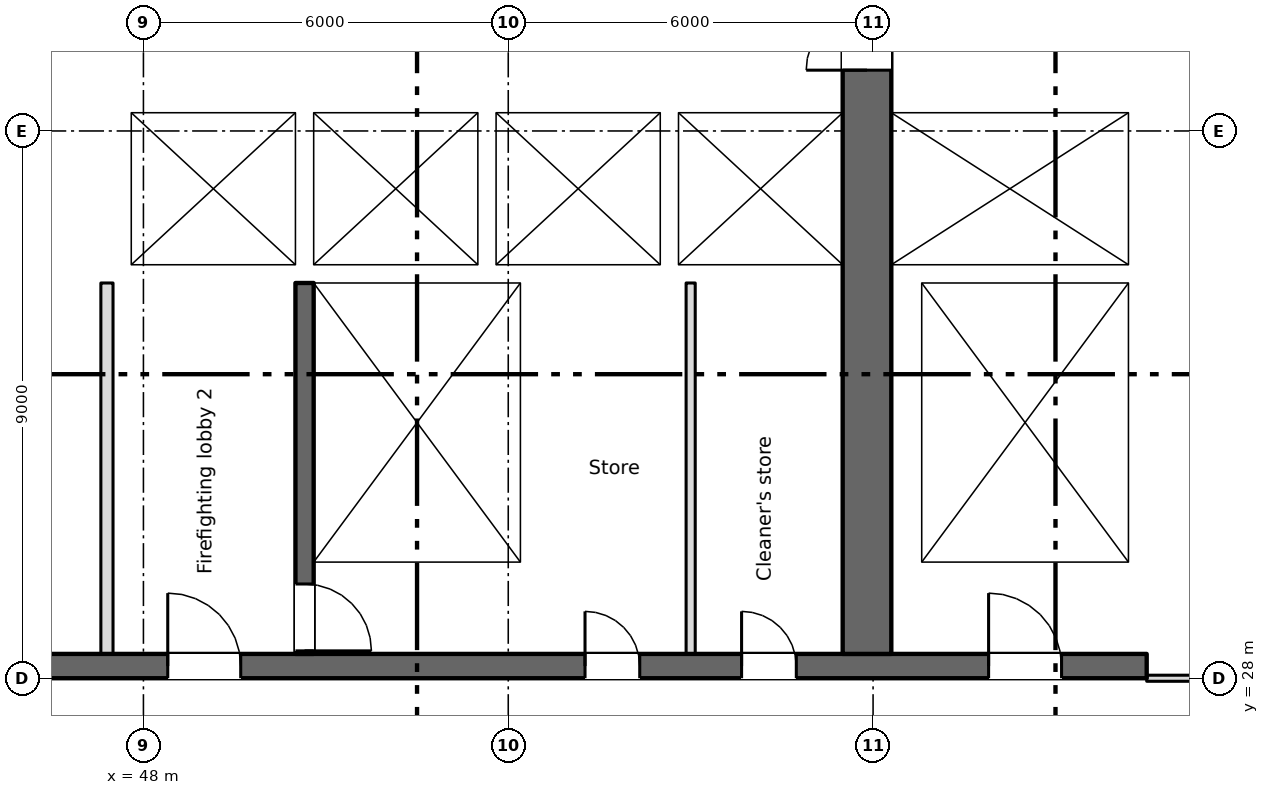
"""IFC4 building model, lengths in metres.
Left out: names, types, materials, properties, quantities, classifications, styles, units other than length and angle.
Written with IfcOpenShell. Run it as: python <this file> out.ifc"""

import sys

from ifc_helpers import new_model, si_unit, direction, frame, frame_2d, origin, place, context, subcontext, project, spatial, rectangle, extrude, element, fill, save


model = new_model("IFC4")
c1 = context("Model", 3, precision=1e-05, world=origin(), true_north=direction((0.0, 1.0)))
c2 = subcontext(c1, "Body", "Model", "MODEL_VIEW")
j1 = project(units=[si_unit("LENGTHUNIT", "METRE"), si_unit("PLANEANGLEUNIT", "RADIAN")], contexts=[c1])
p1 = place(None, origin())
s1 = spatial("IfcSite", under=j1, at=p1, CompositionType="ELEMENT")
p2 = place(p1, origin())
s2 = spatial("IfcBuilding", under=s1, at=p2, CompositionType="ELEMENT")
p3 = place(p2, frame((0.0, 0.0, 147.5)))
s3 = spatial("IfcBuildingStorey", under=s2, at=p3, CompositionType="ELEMENT", Elevation=147.5)
p4 = place(p3, frame((6.7, 28.2, 0.0), z_axis=(0.0, 0.0, 1.0), x_axis=(1.0, 0.0, 0.0)))
e1 = element("IfcWall", 1, at=p4, inside=s3, PredefinedType="SHEAR", context=c2, shape_type="SweptSolid", body=[
    extrude(rectangle(XDim=57.8, YDim=0.4, at=frame_2d((28.9, 0.0))), origin(), (0.0, 0.0, 1.0), 3.35),
])
p5 = place(p4, frame((13.85, 0.0, 0.0)))
e2 = element("IfcOpeningElement", 2, at=p5, cuts=e1, PredefinedType="OPENING", context=c2, shape_type="SweptSolid", body=[
    extrude(rectangle(XDim=0.9, YDim=2.1, at=frame_2d((0.45, 1.05))), frame((0.0, 0.21, 0.0), z_axis=(0.0, -1.0, 0.0), x_axis=(1.0, 0.0, 0.0)), (0.0, 0.0, 1.0), 0.42),
])
p6 = place(p4, frame((48.562, 0.0, 0.0)))
e3 = element("IfcOpeningElement", 3, at=p6, cuts=e1, PredefinedType="OPENING", context=c2, shape_type="SweptSolid", body=[
    extrude(rectangle(XDim=0.9, YDim=2.1, at=frame_2d((0.45, 1.05))), frame((0.0, 0.21, 0.0), z_axis=(0.0, -1.0, 0.0), x_axis=(1.0, 0.0, 0.0)), (0.0, 0.0, 1.0), 0.42),
])
p7 = place(p4, frame((51.137, 0.0, 0.0)))
e4 = element("IfcOpeningElement", 4, at=p7, cuts=e1, PredefinedType="OPENING", context=c2, shape_type="SweptSolid", body=[
    extrude(rectangle(XDim=0.9, YDim=2.1, at=frame_2d((0.45, 1.05))), frame((0.0, 0.21, 0.0), z_axis=(0.0, -1.0, 0.0), x_axis=(1.0, 0.0, 0.0)), (0.0, 0.0, 1.0), 0.42),
])
p8 = place(p4, frame((1.35, 0.0, 0.0)))
e5 = element("IfcOpeningElement", 5, at=p8, cuts=e1, PredefinedType="OPENING", context=c2, shape_type="SweptSolid", body=[
    extrude(rectangle(XDim=0.9, YDim=2.1, at=frame_2d((0.45, 1.05))), frame((0.0, 0.21, 0.0), z_axis=(0.0, -1.0, 0.0), x_axis=(1.0, 0.0, 0.0)), (0.0, 0.0, 1.0), 0.42),
])
p9 = place(p4, frame((4.7, 0.0, 0.0)))
e6 = element("IfcOpeningElement", 6, at=p9, cuts=e1, PredefinedType="OPENING", context=c2, shape_type="SweptSolid", body=[
    extrude(rectangle(XDim=1.2, YDim=2.1, at=frame_2d((0.6, 1.05))), frame((0.0, 0.21, 0.0), z_axis=(0.0, -1.0, 0.0), x_axis=(1.0, 0.0, 0.0)), (0.0, 0.0, 1.0), 0.42),
])
p10 = place(p4, frame((31.7, 0.0, 0.0)))
e7 = element("IfcOpeningElement", 7, at=p10, cuts=e1, PredefinedType="OPENING", context=c2, shape_type="SweptSolid", body=[
    extrude(rectangle(XDim=1.2, YDim=2.1, at=frame_2d((0.6, 1.05))), frame((0.0, 0.21, 0.0), z_axis=(0.0, -1.0, 0.0), x_axis=(1.0, 0.0, 0.0)), (0.0, 0.0, 1.0), 0.42),
])
p11 = place(p4, frame((55.2, 0.0, 0.0)))
e8 = element("IfcOpeningElement", 8, at=p11, cuts=e1, PredefinedType="OPENING", context=c2, shape_type="SweptSolid", body=[
    extrude(rectangle(XDim=1.2, YDim=2.1, at=frame_2d((0.6, 1.05))), frame((0.0, 0.21, 0.0), z_axis=(0.0, -1.0, 0.0), x_axis=(1.0, 0.0, 0.0)), (0.0, 0.0, 1.0), 0.42),
])
p12 = place(p4, frame((21.7, 0.0, 0.0)))
e9 = element("IfcOpeningElement", 9, at=p12, cuts=e1, PredefinedType="OPENING", context=c2, shape_type="SweptSolid", body=[
    extrude(rectangle(XDim=1.2, YDim=2.1, at=frame_2d((0.6, 1.05))), frame((0.0, 0.21, 0.0), z_axis=(0.0, -1.0, 0.0), x_axis=(1.0, 0.0, 0.0)), (0.0, 0.0, 1.0), 0.42),
])
p13 = place(p4, frame((41.7, 0.0, 0.0)))
e10 = element("IfcOpeningElement", 10, at=p13, cuts=e1, PredefinedType="OPENING", context=c2, shape_type="SweptSolid", body=[
    extrude(rectangle(XDim=1.2, YDim=2.1, at=frame_2d((0.6, 1.05))), frame((0.0, 0.21, 0.0), z_axis=(0.0, -1.0, 0.0), x_axis=(1.0, 0.0, 0.0)), (0.0, 0.0, 1.0), 0.42),
])
p14 = place(p4, frame((24.85, 0.0, 0.0)))
e11 = element("IfcOpeningElement", 11, at=p14, cuts=e1, PredefinedType="OPENING", context=c2, shape_type="SweptSolid", body=[
    extrude(rectangle(XDim=2.4, YDim=2.1, at=frame_2d((1.2, 1.05))), frame((0.0, 0.21, 0.0), z_axis=(0.0, -1.0, 0.0), x_axis=(1.0, 0.0, 0.0)), (0.0, 0.0, 1.0), 0.42),
])
p15 = place(p4, frame((37.35, 0.0, 0.0)))
e12 = element("IfcOpeningElement", 12, at=p15, cuts=e1, PredefinedType="OPENING", context=c2, shape_type="SweptSolid", body=[
    extrude(rectangle(XDim=2.4, YDim=2.1, at=frame_2d((1.2, 1.05))), frame((0.0, 0.21, 0.0), z_axis=(0.0, -1.0, 0.0), x_axis=(1.0, 0.0, 0.0)), (0.0, 0.0, 1.0), 0.42),
])
p16 = place(p4, frame((7.95, 0.0, 0.0)))
e13 = element("IfcOpeningElement", 13, at=p16, cuts=e1, PredefinedType="OPENING", context=c2, shape_type="SweptSolid", body=[
    extrude(rectangle(XDim=2.4, YDim=2.1, at=frame_2d((1.2, 1.05))), frame((0.0, 0.21, 0.0), z_axis=(0.0, -1.0, 0.0), x_axis=(1.0, 0.0, 0.0)), (0.0, 0.0, 1.0), 0.42),
])
p17 = place(p4, frame((28.85, 0.0, 0.0)))
e14 = element("IfcOpeningElement", 14, at=p17, cuts=e1, PredefinedType="OPENING", context=c2, shape_type="SweptSolid", body=[
    extrude(rectangle(XDim=0.9, YDim=2.1, at=frame_2d((0.45, 1.05))), frame((0.0, 0.21, 0.0), z_axis=(0.0, -1.0, 0.0), x_axis=(1.0, 0.0, 0.0)), (0.0, 0.0, 1.0), 0.42),
])
p18 = place(p4, frame((34.85, 0.0, 0.0)))
e15 = element("IfcOpeningElement", 15, at=p18, cuts=e1, PredefinedType="OPENING", context=c2, shape_type="SweptSolid", body=[
    extrude(rectangle(XDim=0.9, YDim=2.1, at=frame_2d((0.45, 1.05))), frame((0.0, 0.21, 0.0), z_axis=(0.0, -1.0, 0.0), x_axis=(1.0, 0.0, 0.0)), (0.0, 0.0, 1.0), 0.42),
])
p19 = place(p3, frame((64.35, 34.8, 0.0), z_axis=(0.0, 0.0, 1.0), x_axis=(0.0, 1.0, 0.0)))
e16 = element("IfcWall", 16, at=p19, inside=s3, PredefinedType="SHEAR", context=c2, shape_type="SweptSolid", body=[
    extrude(rectangle(XDim=10.4, YDim=0.3, at=frame_2d((5.2, 0.0))), origin(), (0.0, 0.0, 1.0), 3.35),
])
p20 = place(p3, frame((59.9, 28.4, 0.0), z_axis=(0.0, 0.0, 1.0), x_axis=(0.0, 1.0, 0.0)))
e17 = element("IfcWall", 17, at=p20, inside=s3, PredefinedType="SHEAR", context=c2, shape_type="SweptSolid", body=[
    extrude(rectangle(XDim=16.8, YDim=0.8, at=frame_2d((8.4, 0.0))), origin(), (0.0, 0.0, 1.0), 3.35),
])
p21 = place(p20, frame((9.6, 0.0, 0.0)))
e18 = element("IfcOpeningElement", 18, at=p21, cuts=e17, PredefinedType="OPENING", context=c2, shape_type="SweptSolid", body=[
    extrude(rectangle(XDim=2.0, YDim=2.1, at=frame_2d((1.0, 1.05))), frame((0.0, 0.41, 0.0), z_axis=(0.0, -1.0, 0.0), x_axis=(1.0, 0.0, 0.0)), (0.0, 0.0, 1.0), 0.82),
])
p22 = place(p20, frame((15.35, 0.0, 0.0)))
e19 = element("IfcOpeningElement", 19, at=p22, cuts=e17, PredefinedType="OPENING", context=c2, shape_type="SweptSolid", body=[
    extrude(rectangle(XDim=1.2, YDim=2.1, at=frame_2d((0.6, 1.05))), frame((0.0, 0.41, 0.0), z_axis=(0.0, -1.0, 0.0), x_axis=(1.0, 0.0, 0.0)), (0.0, 0.0, 1.0), 0.82),
])
p23 = place(p3, frame((50.65, 34.5, 0.0), z_axis=(0.0, 0.0, 1.0), x_axis=(0.0, -1.0, 0.0)))
e20 = element("IfcWall", 20, at=p23, inside=s3, PredefinedType="SHEAR", context=c2, shape_type="SweptSolid", body=[
    extrude(rectangle(XDim=6.1, YDim=0.3, at=frame_2d((3.05, 0.0))), origin(), (0.0, 0.0, 1.0), 3.35),
])
p24 = place(p23, frame((4.95, 0.0, 0.0)))
e21 = element("IfcOpeningElement", 21, at=p24, cuts=e20, PredefinedType="OPENING", context=c2, shape_type="SweptSolid", body=[
    extrude(rectangle(XDim=1.1, YDim=2.1, at=frame_2d((0.55, 1.05))), frame((0.0, 0.16, 0.0), z_axis=(0.0, -1.0, 0.0), x_axis=(1.0, 0.0, 0.0)), (0.0, 0.0, 1.0), 0.32),
])
p25 = place(p3, frame((54.35, 28.4, 0.0), z_axis=(0.0, 0.0, 1.0), x_axis=(0.0, 1.0, 0.0)))
e22 = element("IfcWall", 22, at=p25, inside=s3, PredefinedType="SHEAR", context=c2, shape_type="SweptSolid", body=[
    extrude(rectangle(XDim=6.1, YDim=0.3, at=frame_2d((3.05, 0.0))), origin(), (0.0, 0.0, 1.0), 3.35),
])
p26 = place(p3, frame((60.55, 28.4, 0.0), z_axis=(0.0, 0.0, 1.0), x_axis=(0.0, 1.0, 0.0)))
e23 = element("IfcWall", 23, at=p26, inside=s3, PredefinedType="SHEAR", context=c2, shape_type="SweptSolid", body=[
    extrude(rectangle(XDim=6.1, YDim=0.5, at=frame_2d((3.05, 0.0))), origin(), (0.0, 0.0, 1.0), 3.35),
])
p27 = place(p3, frame((64.35, 28.4, 0.0), z_axis=(0.0, 0.0, 1.0), x_axis=(0.0, 1.0, 0.0)))
e24 = element("IfcWall", 24, at=p27, inside=s3, PredefinedType="SHEAR", context=c2, shape_type="SweptSolid", body=[
    extrude(rectangle(XDim=6.1, YDim=0.3, at=frame_2d((3.05, 0.0))), origin(), (0.0, 0.0, 1.0), 3.35),
])
p28 = place(p3, frame((47.3, 34.65, 0.0), z_axis=(0.0, 0.0, 1.0), x_axis=(1.0, 0.0, 0.0)))
e25 = element("IfcWall", 25, at=p28, inside=s3, PredefinedType="SHEAR", context=c2, shape_type="SweptSolid", body=[
    extrude(rectangle(XDim=12.2, YDim=0.3, at=frame_2d((6.1, 0.0))), origin(), (0.0, 0.0, 1.0), 3.35),
])
p29 = place(p28, frame((1.3, 0.0, 0.0)))
e26 = element("IfcOpeningElement", 26, at=p29, cuts=e25, PredefinedType="OPENING", context=c2, shape_type="SweptSolid", body=[
    extrude(rectangle(XDim=1.1, YDim=2.1, at=frame_2d((0.55, 1.05))), frame((0.0, 0.16, 0.0), z_axis=(0.0, -1.0, 0.0), x_axis=(1.0, 0.0, 0.0)), (0.0, 0.0, 1.0), 0.32),
])
p30 = place(p3, frame((60.3, 34.65, 0.0), z_axis=(0.0, 0.0, 1.0), x_axis=(1.0, 0.0, 0.0)))
e27 = element("IfcWall", 27, at=p30, inside=s3, PredefinedType="SHEAR", context=c2, shape_type="SweptSolid", body=[
    extrude(rectangle(XDim=4.2, YDim=0.3, at=frame_2d((2.1, 0.0))), origin(), (0.0, 0.0, 1.0), 3.35),
])
p31 = place(p3, frame((47.3, 37.45, 0.0), z_axis=(0.0, 0.0, 1.0), x_axis=(1.0, 0.0, 0.0)))
e28 = element("IfcWall", 28, at=p31, inside=s3, PredefinedType="SHEAR", context=c2, shape_type="SweptSolid", body=[
    extrude(rectangle(XDim=12.2, YDim=0.3, at=frame_2d((6.1, 0.0))), origin(), (0.0, 0.0, 1.0), 3.35),
])
p32 = place(p31, frame((4.3, 0.0, 0.0)))
e29 = element("IfcOpeningElement", 29, at=p32, cuts=e28, PredefinedType="OPENING", context=c2, shape_type="SweptSolid", body=[
    extrude(rectangle(XDim=1.1, YDim=2.1, at=frame_2d((0.55, 1.05))), frame((0.0, 0.16, 0.0), z_axis=(0.0, -1.0, 0.0), x_axis=(1.0, 0.0, 0.0)), (0.0, 0.0, 1.0), 0.32),
])
p33 = place(p31, frame((7.3, 0.0, 0.0)))
e30 = element("IfcOpeningElement", 30, at=p33, cuts=e28, PredefinedType="OPENING", context=c2, shape_type="SweptSolid", body=[
    extrude(rectangle(XDim=1.1, YDim=2.1, at=frame_2d((0.55, 1.05))), frame((0.0, 0.16, 0.0), z_axis=(0.0, -1.0, 0.0), x_axis=(1.0, 0.0, 0.0)), (0.0, 0.0, 1.0), 0.32),
])
p34 = place(p31, frame((10.3, 0.0, 0.0)))
e31 = element("IfcOpeningElement", 31, at=p34, cuts=e28, PredefinedType="OPENING", context=c2, shape_type="SweptSolid", body=[
    extrude(rectangle(XDim=1.1, YDim=2.1, at=frame_2d((0.55, 1.05))), frame((0.0, 0.16, 0.0), z_axis=(0.0, -1.0, 0.0), x_axis=(1.0, 0.0, 0.0)), (0.0, 0.0, 1.0), 0.32),
])
p35 = place(p3, frame((60.3, 37.45, 0.0), z_axis=(0.0, 0.0, 1.0), x_axis=(1.0, 0.0, 0.0)))
e32 = element("IfcWall", 32, at=p35, inside=s3, PredefinedType="SHEAR", context=c2, shape_type="SweptSolid", body=[
    extrude(rectangle(XDim=3.9, YDim=0.3, at=frame_2d((1.95, 0.0))), origin(), (0.0, 0.0, 1.0), 3.35),
])
p36 = place(p35, frame((1.4, 0.0, 0.0)))
e33 = element("IfcOpeningElement", 33, at=p36, cuts=e32, PredefinedType="OPENING", context=c2, shape_type="SweptSolid", body=[
    extrude(rectangle(XDim=1.1, YDim=2.1, at=frame_2d((0.55, 1.05))), frame((0.0, 0.16, 0.0), z_axis=(0.0, -1.0, 0.0), x_axis=(1.0, 0.0, 0.0)), (0.0, 0.0, 1.0), 0.32),
])
p37 = place(p3, frame((47.55, 34.8, 0.0), z_axis=(0.0, 0.0, 1.0), x_axis=(0.0, 1.0, 0.0)))
e34 = element("IfcWall", 34, at=p37, inside=s3, PredefinedType="SHEAR", context=c2, shape_type="SweptSolid", body=[
    extrude(rectangle(XDim=2.5, YDim=0.5, at=frame_2d((1.25, 0.0))), origin(), (0.0, 0.0, 1.0), 3.35),
])
for number, where, z_axis, x_axis in (
    (35, (50.65, 34.8, 0.0), (0.0, 0.0, 1.0), (0.0, 1.0, 0.0)),
    (36, (53.65, 34.8, 0.0), (0.0, 0.0, 1.0), (0.0, 1.0, 0.0)),
    (37, (56.65, 34.8, 0.0), (0.0, 0.0, 1.0), (0.0, 1.0, 0.0)),
):
    element("IfcWall", number, at=place(p3, frame(where, z_axis=z_axis, x_axis=x_axis)), inside=s3, PredefinedType="SHEAR", context=c2, shape_type="SweptSolid", body=[
        extrude(rectangle(XDim=2.5, YDim=0.3, at=frame_2d((1.25, 0.0))), origin(), (0.0, 0.0, 1.0), 3.35),
    ])
p38 = place(p3, frame((47.4, 28.4, 0.0), z_axis=(0.0, 0.0, 1.0), x_axis=(0.0, 1.0, 0.0)))
e38 = element("IfcWall", 38, at=p38, inside=s3, PredefinedType="PARTITIONING", context=c2, shape_type="SweptSolid", body=[
    extrude(rectangle(XDim=6.1, YDim=0.2, at=frame_2d((3.05, 0.0))), origin(), (0.0, 0.0, 1.0), 3.35),
])
p39 = place(p3, frame((57.0, 28.4, 0.0), z_axis=(0.0, 0.0, 1.0), x_axis=(0.0, 1.0, 0.0)))
e39 = element("IfcWall", 39, at=p39, inside=s3, PredefinedType="PARTITIONING", context=c2, shape_type="SweptSolid", body=[
    extrude(rectangle(XDim=6.1, YDim=0.15, at=frame_2d((3.05, 0.0))), origin(), (0.0, 0.0, 1.0), 3.35),
])
p40 = place(p3, frame((64.5, 28.0, 0.0), z_axis=(0.0, 0.0, 1.0), x_axis=(1.0, 0.0, 0.0)))
e40 = element("IfcWall", 40, at=p40, inside=s3, PredefinedType="PARTITIONING", context=c2, shape_type="SweptSolid", body=[
    extrude(rectangle(XDim=6.8, YDim=0.1, at=frame_2d((3.4, 0.0))), origin(), (0.0, 0.0, 1.0), 3.35),
])
p41 = place(p40, frame((2.5, 0.0, 0.0)))
e41 = element("IfcOpeningElement", 41, at=p41, cuts=e40, PredefinedType="OPENING", context=c2, shape_type="SweptSolid", body=[
    extrude(rectangle(XDim=1.8, YDim=2.1, at=frame_2d((0.9, 1.05))), frame((0.0, 0.06, 0.0), z_axis=(0.0, -1.0, 0.0), x_axis=(1.0, 0.0, 0.0)), (0.0, 0.0, 1.0), 0.12),
])
p42 = place(p6, origin())
e42 = element("IfcDoor", 42, at=p42, inside=s3, OperationType="SINGLE_SWING_LEFT", PredefinedType="DOOR", context=c2, shape_type="SweptSolid", body=[
    extrude(rectangle(XDim=0.9, YDim=2.1, at=frame_2d((0.45, 1.05))), frame((0.0, 0.025, 0.0), z_axis=(0.0, -1.0, 0.0), x_axis=(1.0, 0.0, 0.0)), (0.0, 0.0, 1.0), 0.05),
])
fill(e3, e42)
p43 = place(p7, origin())
e43 = element("IfcDoor", 43, at=p43, inside=s3, OperationType="SINGLE_SWING_LEFT", PredefinedType="DOOR", context=c2, shape_type="SweptSolid", body=[
    extrude(rectangle(XDim=0.9, YDim=2.1, at=frame_2d((0.45, 1.05))), frame((0.0, 0.025, 0.0), z_axis=(0.0, -1.0, 0.0), x_axis=(1.0, 0.0, 0.0)), (0.0, 0.0, 1.0), 0.05),
])
fill(e4, e43)
p44 = place(p32, origin())
e44 = element("IfcDoor", 44, at=p44, inside=s3, OperationType="SLIDING_TO_LEFT", PredefinedType="DOOR", context=c2, shape_type="SweptSolid", body=[
    extrude(rectangle(XDim=1.1, YDim=2.1, at=frame_2d((0.55, 1.05))), frame((0.0, 0.025, 0.0), z_axis=(0.0, -1.0, 0.0), x_axis=(1.0, 0.0, 0.0)), (0.0, 0.0, 1.0), 0.05),
])
fill(e29, e44)
p45 = place(p33, origin())
e45 = element("IfcDoor", 45, at=p45, inside=s3, OperationType="SLIDING_TO_LEFT", PredefinedType="DOOR", context=c2, shape_type="SweptSolid", body=[
    extrude(rectangle(XDim=1.1, YDim=2.1, at=frame_2d((0.55, 1.05))), frame((0.0, 0.025, 0.0), z_axis=(0.0, -1.0, 0.0), x_axis=(1.0, 0.0, 0.0)), (0.0, 0.0, 1.0), 0.05),
])
fill(e30, e45)
p46 = place(p34, origin())
e46 = element("IfcDoor", 46, at=p46, inside=s3, OperationType="SLIDING_TO_LEFT", PredefinedType="DOOR", context=c2, shape_type="SweptSolid", body=[
    extrude(rectangle(XDim=1.1, YDim=2.1, at=frame_2d((0.55, 1.05))), frame((0.0, 0.025, 0.0), z_axis=(0.0, -1.0, 0.0), x_axis=(1.0, 0.0, 0.0)), (0.0, 0.0, 1.0), 0.05),
])
fill(e31, e46)
p47 = place(p36, origin())
e47 = element("IfcDoor", 47, at=p47, inside=s3, OperationType="SLIDING_TO_LEFT", PredefinedType="DOOR", context=c2, shape_type="SweptSolid", body=[
    extrude(rectangle(XDim=1.1, YDim=2.1, at=frame_2d((0.55, 1.05))), frame((0.0, 0.025, 0.0), z_axis=(0.0, -1.0, 0.0), x_axis=(1.0, 0.0, 0.0)), (0.0, 0.0, 1.0), 0.05),
])
fill(e33, e47)
p48 = place(p29, origin())
e48 = element("IfcDoor", 48, at=p48, inside=s3, OperationType="SLIDING_TO_LEFT", PredefinedType="DOOR", context=c2, shape_type="SweptSolid", body=[
    extrude(rectangle(XDim=1.1, YDim=2.1, at=frame_2d((0.55, 1.05))), frame((0.0, 0.025, 0.0), z_axis=(0.0, -1.0, 0.0), x_axis=(1.0, 0.0, 0.0)), (0.0, 0.0, 1.0), 0.05),
])
fill(e26, e48)
p49 = place(p24, origin())
e49 = element("IfcDoor", 49, at=p49, inside=s3, OperationType="SINGLE_SWING_RIGHT", PredefinedType="DOOR", context=c2, shape_type="SweptSolid", body=[
    extrude(rectangle(XDim=1.1, YDim=2.1, at=frame_2d((0.55, 1.05))), frame((0.0, 0.025, 0.0), z_axis=(0.0, -1.0, 0.0), x_axis=(1.0, 0.0, 0.0)), (0.0, 0.0, 1.0), 0.05),
])
fill(e21, e49)
p50 = place(p11, origin())
e50 = element("IfcDoor", 50, at=p50, inside=s3, OperationType="SINGLE_SWING_LEFT", PredefinedType="DOOR", context=c2, shape_type="SweptSolid", body=[
    extrude(rectangle(XDim=1.2, YDim=2.1, at=frame_2d((0.6, 1.05))), frame((0.0, 0.025, 0.0), z_axis=(0.0, -1.0, 0.0), x_axis=(1.0, 0.0, 0.0)), (0.0, 0.0, 1.0), 0.05),
])
fill(e8, e50)
p51 = place(p13, origin())
e51 = element("IfcDoor", 51, at=p51, inside=s3, OperationType="SINGLE_SWING_LEFT", PredefinedType="DOOR", context=c2, shape_type="SweptSolid", body=[
    extrude(rectangle(XDim=1.2, YDim=2.1, at=frame_2d((0.6, 1.05))), frame((0.0, 0.025, 0.0), z_axis=(0.0, -1.0, 0.0), x_axis=(1.0, 0.0, 0.0)), (0.0, 0.0, 1.0), 0.05),
])
fill(e10, e51)
p52 = place(p21, origin())
e52 = element("IfcDoor", 52, at=p52, inside=s3, OperationType="DOUBLE_DOOR_SINGLE_SWING", PredefinedType="DOOR", context=c2, shape_type="SweptSolid", body=[
    extrude(rectangle(XDim=2.0, YDim=2.1, at=frame_2d((1.0, 1.05))), frame((0.0, 0.025, 0.0), z_axis=(0.0, -1.0, 0.0), x_axis=(1.0, 0.0, 0.0)), (0.0, 0.0, 1.0), 0.05),
])
fill(e18, e52)
save(model, sys.argv[1])
